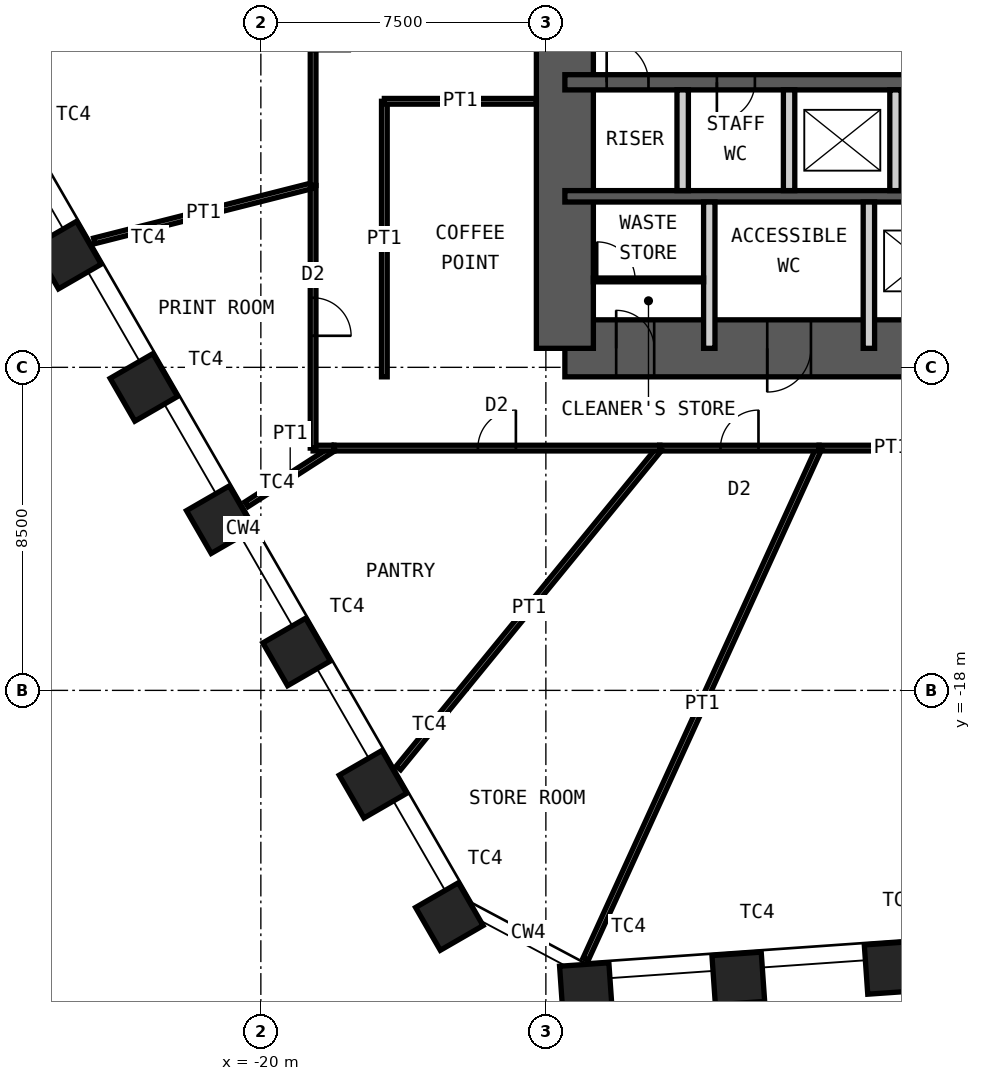
"""IFC4 building model, lengths in metres.
Left out: names, types, materials, properties, quantities, classifications, styles, units other than length and angle.
Written with IfcOpenShell. Run it as: python <this file> out.ifc"""

import sys

from ifc_helpers import new_model, si_unit, direction, frame, frame_2d, origin, origin_2d, place, context, subcontext, project, spatial, rectangle, hollow_rectangle, extrude, element, fill, save


model = new_model("IFC4")
c1 = context("Model", 3, precision=1e-05, world=origin(), true_north=direction((0.0, 1.0)))
c2 = subcontext(c1, "Body", "Model", "MODEL_VIEW")
j1 = project(units=[si_unit("LENGTHUNIT", "METRE"), si_unit("PLANEANGLEUNIT", "RADIAN")], contexts=[c1])
p1 = place(None, origin())
s1 = spatial("IfcSite", under=j1, at=p1, CompositionType="ELEMENT")
p2 = place(p1, origin())
s2 = spatial("IfcBuilding", under=s1, at=p2, CompositionType="ELEMENT")
p3 = place(p2, frame((0.0, 0.0, 153.4)))
s3 = spatial("IfcBuildingStorey", under=s2, at=p3, CompositionType="ELEMENT", Elevation=153.4)
for number, where, z_axis, x_axis in (
    (1, (-3.427, -25.301, 0.0), (0.0, 0.0, 1.0), (0.998, 0.07, 0.0)),
    (2, (-7.436, -25.581, 0.0), (0.0, 0.0, 1.0), (0.998, 0.07, 0.0)),
    (3, (-11.446, -25.861, 0.0), (0.0, 0.0, 1.0), (0.998, 0.07, 0.0)),
    (4, (-15.04, -23.95, 0.0), (0.0, 0.0, 1.0), (0.5, -0.866, 0.0)),
    (5, (-17.049, -20.47, 0.0), (0.0, 0.0, 1.0), (0.5, -0.866, 0.0)),
    (6, (-19.059, -16.989, 0.0), (0.0, 0.0, 1.0), (0.5, -0.866, 0.0)),
    (7, (-21.068, -13.509, 0.0), (0.0, 0.0, 1.0), (0.5, -0.866, 0.0)),
    (8, (-23.078, -10.028, 0.0), (0.0, 0.0, 1.0), (0.5, -0.866, 0.0)),
    (9, (-25.087, -6.547, 0.0), (0.0, 0.0, 1.0), (0.5, -0.866, 0.0)),
):
    element("IfcColumn", number, at=place(p3, frame(where, z_axis=z_axis, x_axis=x_axis)), inside=s3, PredefinedType="COLUMN", context=c2, shape_type="SweptSolid", body=[
        extrude(hollow_rectangle(XDim=1.3, YDim=1.3, WallThickness=0.1, at=origin_2d()), origin(), (0.0, 0.0, 1.0), 4.2),
    ])
p4 = place(p3, frame((-12.0, -9.0, 0.0), z_axis=(0.0, 0.0, 1.0), x_axis=(1.0, 0.0, 0.0)))
e10 = element("IfcWall", 10, at=p4, inside=s3, PredefinedType="SHEAR", context=c2, shape_type="SweptSolid", body=[
    extrude(rectangle(XDim=24.0, YDim=1.5, at=frame_2d((12.0, 0.0))), origin(), (0.0, 0.0, 1.0), 4.2),
])
p5 = place(p4, frame((1.35, 0.0, 0.0)))
e11 = element("IfcOpeningElement", 11, at=p5, cuts=e10, PredefinedType="OPENING", context=c2, shape_type="SweptSolid", body=[
    extrude(rectangle(XDim=1.0, YDim=2.1, at=frame_2d((0.5, 1.05))), frame((0.0, 0.76, 0.0), z_axis=(0.0, -1.0, 0.0), x_axis=(1.0, 0.0, 0.0)), (0.0, 0.0, 1.0), 1.52),
])
p6 = place(p4, frame((5.325, 0.0, 0.0)))
e12 = element("IfcOpeningElement", 12, at=p6, cuts=e10, PredefinedType="OPENING", context=c2, shape_type="SweptSolid", body=[
    extrude(rectangle(XDim=1.15, YDim=2.1, at=frame_2d((0.575, 1.05))), frame((0.0, 0.76, 0.0), z_axis=(0.0, -1.0, 0.0), x_axis=(1.0, 0.0, 0.0)), (0.0, 0.0, 1.0), 1.52),
])
p7 = place(p4, frame((12.6, 0.0, 0.0)))
e13 = element("IfcOpeningElement", 13, at=p7, cuts=e10, PredefinedType="OPENING", context=c2, shape_type="SweptSolid", body=[
    extrude(rectangle(XDim=1.0, YDim=2.1, at=frame_2d((0.5, 1.05))), frame((0.0, 0.76, 0.0), z_axis=(0.0, -1.0, 0.0), x_axis=(1.0, 0.0, 0.0)), (0.0, 0.0, 1.0), 1.52),
])
p8 = place(p3, frame((-12.0, -9.0, 0.0), z_axis=(0.0, 0.0, 1.0), x_axis=(0.0, 1.0, 0.0)))
e14 = element("IfcWall", 14, at=p8, inside=s3, PredefinedType="SHEAR", context=c2, shape_type="SweptSolid", body=[
    extrude(rectangle(XDim=18.0, YDim=1.5, at=frame_2d((9.0, 0.0))), origin(), (0.0, 0.0, 1.0), 4.2),
])
p9 = place(p8, frame((8.1, 0.0, 0.0)))
e15 = element("IfcOpeningElement", 15, at=p9, cuts=e14, PredefinedType="OPENING", context=c2, shape_type="SweptSolid", body=[
    extrude(rectangle(XDim=1.8, YDim=2.1, at=frame_2d((0.9, 1.05))), frame((0.0, 0.76, 0.0), z_axis=(0.0, -1.0, 0.0), x_axis=(1.0, 0.0, 0.0)), (0.0, 0.0, 1.0), 1.52),
])
p10 = place(p3, frame((-12.0, -2.0, 0.0), z_axis=(0.0, 0.0, 1.0), x_axis=(1.0, 0.0, 0.0)))
e16 = element("IfcWall", 16, at=p10, inside=s3, PredefinedType="SHEAR", context=c2, shape_type="SweptSolid", body=[
    extrude(rectangle(XDim=24.0, YDim=0.4, at=frame_2d((12.0, 0.0))), origin(), (0.0, 0.0, 1.0), 4.2),
])
p11 = place(p10, frame((1.1, 0.0, 0.0)))
e17 = element("IfcOpeningElement", 17, at=p11, cuts=e16, PredefinedType="OPENING", context=c2, shape_type="SweptSolid", body=[
    extrude(rectangle(XDim=1.1, YDim=2.1, at=frame_2d((0.55, 1.05))), frame((0.0, 0.21, 0.0), z_axis=(0.0, -1.0, 0.0), x_axis=(1.0, 0.0, 0.0)), (0.0, 0.0, 1.0), 0.42),
])
p12 = place(p10, frame((13.55, 0.0, 0.0)))
e18 = element("IfcOpeningElement", 18, at=p12, cuts=e16, PredefinedType="OPENING", context=c2, shape_type="SweptSolid", body=[
    extrude(rectangle(XDim=1.1, YDim=2.1, at=frame_2d((0.55, 1.05))), frame((0.0, 0.21, 0.0), z_axis=(0.0, -1.0, 0.0), x_axis=(1.0, 0.0, 0.0)), (0.0, 0.0, 1.0), 0.42),
])
p13 = place(p10, frame((20.7, 0.0, 0.0)))
e19 = element("IfcOpeningElement", 19, at=p13, cuts=e16, PredefinedType="OPENING", context=c2, shape_type="SweptSolid", body=[
    extrude(rectangle(XDim=1.1, YDim=2.1, at=frame_2d((0.55, 1.05))), frame((0.0, 0.21, 0.0), z_axis=(0.0, -1.0, 0.0), x_axis=(1.0, 0.0, 0.0)), (0.0, 0.0, 1.0), 0.42),
])
p14 = place(p10, frame((4.0, 0.0, 0.0)))
e20 = element("IfcOpeningElement", 20, at=p14, cuts=e16, PredefinedType="OPENING", context=c2, shape_type="SweptSolid", body=[
    extrude(rectangle(XDim=1.0, YDim=2.1, at=frame_2d((0.5, 1.05))), frame((0.0, 0.21, 0.0), z_axis=(0.0, -1.0, 0.0), x_axis=(1.0, 0.0, 0.0)), (0.0, 0.0, 1.0), 0.42),
])
p15 = place(p3, frame((-12.0, -5.0, 0.0), z_axis=(0.0, 0.0, 1.0), x_axis=(1.0, 0.0, 0.0)))
e21 = element("IfcWall", 21, at=p15, inside=s3, PredefinedType="SHEAR", context=c2, shape_type="SweptSolid", body=[
    extrude(rectangle(XDim=24.0, YDim=0.3, at=frame_2d((12.0, 0.0))), origin(), (0.0, 0.0, 1.0), 4.2),
])
for number, where, z_axis, x_axis in (
    (22, (-8.9, -4.85, 0.0), (0.0, 0.0, 1.0), (0.0, 1.0, 0.0)),
    (23, (-6.1, -4.85, 0.0), (0.0, 0.0, 1.0), (0.0, 1.0, 0.0)),
    (24, (-3.3, -4.85, 0.0), (0.0, 0.0, 1.0), (0.0, 1.0, 0.0)),
):
    element("IfcWall", number, at=place(p3, frame(where, z_axis=z_axis, x_axis=x_axis)), inside=s3, PredefinedType="PARTITIONING", context=c2, shape_type="SweptSolid", body=[
        extrude(rectangle(XDim=2.65, YDim=0.3, at=frame_2d((1.325, 0.0))), origin(), (0.0, 0.0, 1.0), 3.98),
    ])
for number, where, z_axis, x_axis in (
    (25, (-8.2, -9.0, 0.0), (0.0, 0.0, 1.0), (0.0, 1.0, 0.0)),
    (26, (-4.0, -9.0, 0.0), (0.0, 0.0, 1.0), (0.0, 1.0, 0.0)),
):
    element("IfcWall", number, at=place(p3, frame(where, z_axis=z_axis, x_axis=x_axis)), inside=s3, PredefinedType="PARTITIONING", context=c2, shape_type="SweptSolid", body=[
        extrude(rectangle(XDim=3.85, YDim=0.3, at=frame_2d((1.925, 0.0))), origin(), (0.0, 0.0, 1.0), 3.98),
    ])
p16 = place(p3, frame((-11.25, -7.2, 0.0), z_axis=(0.0, 0.0, 1.0), x_axis=(1.0, 0.0, 0.0)))
e27 = element("IfcWall", 27, at=p16, inside=s3, PredefinedType="PARTITIONING", context=c2, shape_type="SweptSolid", body=[
    extrude(rectangle(XDim=2.9, YDim=0.1, at=frame_2d((1.45, 0.0))), origin(), (0.0, 0.0, 1.0), 3.98),
])
p17 = place(p16, frame((0.1, 0.0, 0.0)))
e28 = element("IfcOpeningElement", 28, at=p17, cuts=e27, PredefinedType="OPENING", context=c2, shape_type="SweptSolid", body=[
    extrude(rectangle(XDim=1.0, YDim=2.4, at=frame_2d((0.5, 1.2))), frame((0.0, 0.06, 0.0), z_axis=(0.0, -1.0, 0.0), x_axis=(1.0, 0.0, 0.0)), (0.0, 0.0, 1.0), 0.12),
])
p18 = place(p3, frame((4.184, -11.625, 0.0), z_axis=(0.0, 0.0, 1.0), x_axis=(-1.0, 0.0, 0.0)))
e29 = element("IfcWall", 29, at=p18, inside=s3, PredefinedType="PARTITIONING", context=c2, shape_type="SweptSolid", body=[
    extrude(rectangle(XDim=9.494, YDim=0.15, at=frame_2d((4.747, 0.0))), origin(), (0.0, 0.0, 1.0), 4.03),
])
p19 = place(p18, frame((3.847, 0.0, 0.0)))
e30 = element("IfcOpeningElement", 30, at=p19, cuts=e29, PredefinedType="OPENING", context=c2, shape_type="SweptSolid", body=[
    extrude(rectangle(XDim=1.8, YDim=2.4, at=frame_2d((0.9, 1.2))), frame((0.0, 0.085, 0.0), z_axis=(0.0, -1.0, 0.0), x_axis=(1.0, 0.0, 0.0)), (0.0, 0.0, 1.0), 0.17),
])
p20 = place(p3, frame((-11.453, -25.072, 0.0), z_axis=(0.0, 0.0, 1.0), x_axis=(0.415494357555, 0.909595755729, 0.0)))
e31 = element("IfcWall", 31, at=p20, inside=s3, PredefinedType="PARTITIONING", context=c2, shape_type="SweptSolid", body=[
    extrude(rectangle(XDim=14.784, YDim=0.15, at=frame_2d((7.392, 0.0))), origin(), (0.0, 0.0, 1.0), 2.93),
])
p21 = place(p3, frame((-5.31, -11.625, 0.0), z_axis=(0.0, 0.0, 1.0), x_axis=(-1.0, 0.0, 0.0)))
e32 = element("IfcWall", 32, at=p21, inside=s3, PredefinedType="PARTITIONING", context=c2, shape_type="SweptSolid", body=[
    extrude(rectangle(XDim=4.19, YDim=0.15, at=frame_2d((2.095, 0.0))), origin(), (0.0, 0.0, 1.0), 4.03),
])
p22 = place(p21, frame((1.595, 0.0, 0.0)))
e33 = element("IfcOpeningElement", 33, at=p22, cuts=e32, PredefinedType="OPENING", context=c2, shape_type="SweptSolid", body=[
    extrude(rectangle(XDim=1.0, YDim=2.4, at=frame_2d((0.5, 1.2))), frame((0.0, 0.085, 0.0), z_axis=(0.0, -1.0, 0.0), x_axis=(1.0, 0.0, 0.0)), (0.0, 0.0, 1.0), 0.17),
])
p23 = place(p3, frame((-16.38, -20.042, 0.0), z_axis=(0.0, 0.0, 1.0), x_axis=(0.632814540967, 0.774303400962, 0.0)))
e34 = element("IfcWall", 34, at=p23, inside=s3, PredefinedType="PARTITIONING", context=c2, shape_type="SweptSolid", body=[
    extrude(rectangle(XDim=10.871, YDim=0.15, at=frame_2d((5.435, 0.0))), origin(), (0.0, 0.0, 1.0), 3.33),
])
p24 = place(p3, frame((-9.501, -11.625, 0.0), z_axis=(0.0, 0.0, 1.0), x_axis=(-1.0, 0.0, 0.0)))
e35 = element("IfcWall", 35, at=p24, inside=s3, PredefinedType="PARTITIONING", context=c2, shape_type="SweptSolid", body=[
    extrude(rectangle(XDim=8.577, YDim=0.15, at=frame_2d((4.288, 0.0))), origin(), (0.0, 0.0, 1.0), 4.03),
])
p25 = place(p24, frame((3.788, 0.0, 0.0)))
e36 = element("IfcOpeningElement", 36, at=p25, cuts=e35, PredefinedType="OPENING", context=c2, shape_type="SweptSolid", body=[
    extrude(rectangle(XDim=1.0, YDim=2.4, at=frame_2d((0.5, 1.2))), frame((0.0, 0.085, 0.0), z_axis=(0.0, -1.0, 0.0), x_axis=(1.0, 0.0, 0.0)), (0.0, 0.0, 1.0), 0.17),
])
p26 = place(p3, frame((-20.378, -13.104, 0.0), z_axis=(0.0, 0.0, 1.0), x_axis=(0.841108871346, 0.540865848934, 0.0)))
e37 = element("IfcWall", 37, at=p26, inside=s3, PredefinedType="PARTITIONING", context=c2, shape_type="SweptSolid", body=[
    extrude(rectangle(XDim=2.735, YDim=0.15, at=frame_2d((1.368, 0.0))), origin(), (0.0, 0.0, 1.0), 3.33),
])
p27 = place(p3, frame((-18.077, -11.625, 0.0), z_axis=(0.0, 0.0, 1.0), x_axis=(-1.0, 0.0, 0.0)))
e38 = element("IfcWall", 38, at=p27, inside=s3, PredefinedType="PARTITIONING", context=c2, shape_type="SweptSolid", body=[
    extrude(rectangle(XDim=0.548, YDim=0.15, at=frame_2d((0.274, 0.0))), origin(), (0.0, 0.0, 1.0), 4.03),
])
p28 = place(p3, frame((-18.625, -11.625, 0.0), z_axis=(0.0, 0.0, 1.0), x_axis=(0.0, 1.0, 0.0)))
e39 = element("IfcWall", 39, at=p28, inside=s3, PredefinedType="PARTITIONING", context=c2, shape_type="SweptSolid", body=[
    extrude(rectangle(XDim=6.91, YDim=0.15, at=frame_2d((3.455, 0.0))), origin(), (0.0, 0.0, 1.0), 4.03),
])
p29 = place(p28, frame((2.955, 0.0, 0.0)))
e40 = element("IfcOpeningElement", 40, at=p29, cuts=e39, PredefinedType="OPENING", context=c2, shape_type="SweptSolid", body=[
    extrude(rectangle(XDim=1.0, YDim=2.4, at=frame_2d((0.5, 1.2))), frame((0.0, 0.085, 0.0), z_axis=(0.0, -1.0, 0.0), x_axis=(1.0, 0.0, 0.0)), (0.0, 0.0, 1.0), 0.17),
])
p30 = place(p3, frame((-24.384, -6.173, 0.0), z_axis=(0.0, 0.0, 1.0), x_axis=(0.969427635767, 0.245377380804, 0.0)))
e41 = element("IfcWall", 41, at=p30, inside=s3, PredefinedType="PARTITIONING", context=c2, shape_type="SweptSolid", body=[
    extrude(rectangle(XDim=5.941, YDim=0.15, at=frame_2d((2.97, 0.0))), origin(), (0.0, 0.0, 1.0), 3.33),
])
p31 = place(p3, frame((-18.625, -4.715, 0.0), z_axis=(0.0, 0.0, 1.0), x_axis=(0.0, 1.0, 0.0)))
e42 = element("IfcWall", 42, at=p31, inside=s3, PredefinedType="PARTITIONING", context=c2, shape_type="SweptSolid", body=[
    extrude(rectangle(XDim=8.068, YDim=0.15, at=frame_2d((4.034, 0.0))), origin(), (0.0, 0.0, 1.0), 4.03),
])
p32 = place(p31, frame((3.534, 0.0, 0.0)))
e43 = element("IfcOpeningElement", 43, at=p32, cuts=e42, PredefinedType="OPENING", context=c2, shape_type="SweptSolid", body=[
    extrude(rectangle(XDim=1.0, YDim=2.4, at=frame_2d((0.5, 1.2))), frame((0.0, 0.085, 0.0), z_axis=(0.0, -1.0, 0.0), x_axis=(1.0, 0.0, 0.0)), (0.0, 0.0, 1.0), 0.17),
])
p33 = place(p3, frame((-16.75, -9.75, 0.0), z_axis=(0.0, 0.0, 1.0), x_axis=(0.0, 1.0, 0.0)))
e44 = element("IfcWall", 44, at=p33, inside=s3, PredefinedType="PARTITIONING", context=c2, shape_type="SweptSolid", body=[
    extrude(rectangle(XDim=7.25, YDim=0.15, at=frame_2d((3.625, 0.0))), origin(), (0.0, 0.0, 1.0), 4.03),
])
p34 = place(p3, frame((-12.75, -2.5, 0.0), z_axis=(0.0, 0.0, 1.0), x_axis=(-1.0, 0.0, 0.0)))
e45 = element("IfcWall", 45, at=p34, inside=s3, PredefinedType="PARTITIONING", context=c2, shape_type="SweptSolid", body=[
    extrude(rectangle(XDim=4.0, YDim=0.15, at=frame_2d((2.0, 0.0))), origin(), (0.0, 0.0, 1.0), 3.33),
])
p35 = place(p5, origin())
e46 = element("IfcDoor", 46, at=p35, inside=s3, OperationType="SINGLE_SWING_RIGHT", PredefinedType="DOOR", context=c2, shape_type="SweptSolid", body=[
    extrude(rectangle(XDim=1.0, YDim=2.1, at=frame_2d((0.5, 1.05))), frame((0.0, 0.025, 0.0), z_axis=(0.0, -1.0, 0.0), x_axis=(1.0, 0.0, 0.0)), (0.0, 0.0, 1.0), 0.05),
])
fill(e11, e46)
p36 = place(p6, origin())
e47 = element("IfcDoor", 47, at=p36, inside=s3, OperationType="SINGLE_SWING_LEFT", PredefinedType="DOOR", context=c2, shape_type="SweptSolid", body=[
    extrude(rectangle(XDim=1.15, YDim=2.1, at=frame_2d((0.575, 1.05))), frame((0.0, 0.025, 0.0), z_axis=(0.0, -1.0, 0.0), x_axis=(1.0, 0.0, 0.0)), (0.0, 0.0, 1.0), 0.05),
])
fill(e12, e47)
p37 = place(p11, origin())
e48 = element("IfcDoor", 48, at=p37, inside=s3, OperationType="SINGLE_SWING_RIGHT", PredefinedType="DOOR", context=c2, shape_type="SweptSolid", body=[
    extrude(rectangle(XDim=1.1, YDim=2.1, at=frame_2d((0.55, 1.05))), frame((0.0, 0.025, 0.0), z_axis=(0.0, -1.0, 0.0), x_axis=(1.0, 0.0, 0.0)), (0.0, 0.0, 1.0), 0.05),
])
fill(e17, e48)
p38 = place(p14, origin())
e49 = element("IfcDoor", 49, at=p38, inside=s3, OperationType="SINGLE_SWING_LEFT", PredefinedType="DOOR", context=c2, shape_type="SweptSolid", body=[
    extrude(rectangle(XDim=1.0, YDim=2.1, at=frame_2d((0.5, 1.05))), frame((0.0, 0.025, 0.0), z_axis=(0.0, -1.0, 0.0), x_axis=(1.0, 0.0, 0.0)), (0.0, 0.0, 1.0), 0.05),
])
fill(e20, e49)
p39 = place(p17, origin())
e50 = element("IfcDoor", 50, at=p39, inside=s3, OperationType="SINGLE_SWING_RIGHT", PredefinedType="DOOR", context=c2, shape_type="SweptSolid", body=[
    extrude(rectangle(XDim=1.0, YDim=2.4, at=frame_2d((0.5, 1.2))), frame((0.0, 0.025, 0.0), z_axis=(0.0, -1.0, 0.0), x_axis=(1.0, 0.0, 0.0)), (0.0, 0.0, 1.0), 0.05),
])
fill(e28, e50)
p40 = place(p22, origin())
e51 = element("IfcDoor", 51, at=p40, inside=s3, OperationType="SINGLE_SWING_LEFT", PredefinedType="DOOR", context=c2, shape_type="SweptSolid", body=[
    extrude(rectangle(XDim=1.0, YDim=2.4, at=frame_2d((0.5, 1.2))), frame((0.0, 0.025, 0.0), z_axis=(0.0, -1.0, 0.0), x_axis=(1.0, 0.0, 0.0)), (0.0, 0.0, 1.0), 0.05),
])
fill(e33, e51)
p41 = place(p25, origin())
e52 = element("IfcDoor", 52, at=p41, inside=s3, OperationType="SINGLE_SWING_LEFT", PredefinedType="DOOR", context=c2, shape_type="SweptSolid", body=[
    extrude(rectangle(XDim=1.0, YDim=2.4, at=frame_2d((0.5, 1.2))), frame((0.0, 0.025, 0.0), z_axis=(0.0, -1.0, 0.0), x_axis=(1.0, 0.0, 0.0)), (0.0, 0.0, 1.0), 0.05),
])
fill(e36, e52)
p42 = place(p29, origin())
e53 = element("IfcDoor", 53, at=p42, inside=s3, OperationType="SINGLE_SWING_LEFT", PredefinedType="DOOR", context=c2, shape_type="SweptSolid", body=[
    extrude(rectangle(XDim=1.0, YDim=2.4, at=frame_2d((0.5, 1.2))), frame((0.0, 0.025, 0.0), z_axis=(0.0, -1.0, 0.0), x_axis=(1.0, 0.0, 0.0)), (0.0, 0.0, 1.0), 0.05),
])
fill(e40, e53)
save(model, sys.argv[1])
